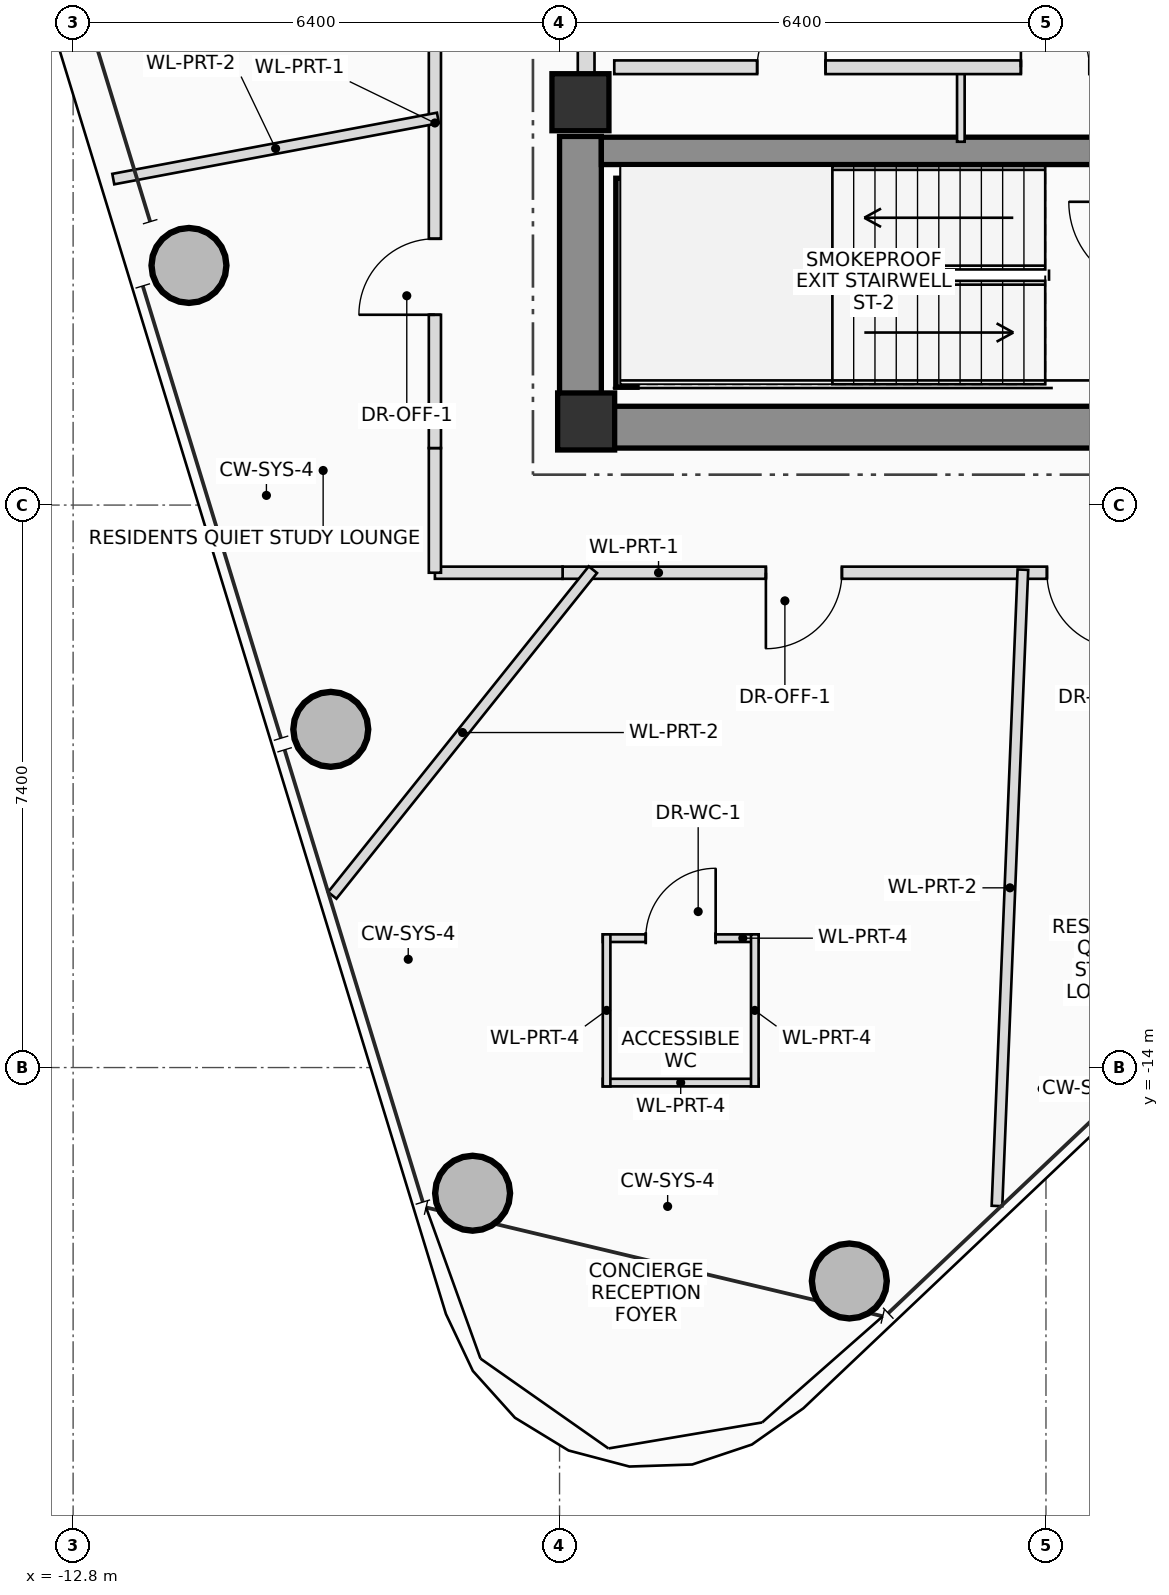
"""IFC4 building model, lengths in metres.
Left out: names, types, materials, properties, quantities, classifications, styles, units other than length and angle.
Written with IfcOpenShell. Run it as: python <this file> out.ifc"""

import sys

from ifc_helpers import new_model, si_unit, direction, frame, frame_2d, origin, origin_2d, place, context, subcontext, project, spatial, rectangle, hollow_circle, extrude, source, transform, mapped, element, fill, save


model = new_model("IFC4")
c1 = context("Model", 3, precision=1e-05, world=origin(), true_north=direction((0.0, 1.0)))
c2 = subcontext(c1, "Body", "Model", "MODEL_VIEW")
j1 = project(units=[si_unit("LENGTHUNIT", "METRE"), si_unit("PLANEANGLEUNIT", "RADIAN")], contexts=[c1])
p1 = place(None, origin())
s1 = spatial("IfcSite", under=j1, at=p1, CompositionType="ELEMENT")
p2 = place(p1, origin())
s2 = spatial("IfcBuilding", under=s1, at=p2, CompositionType="ELEMENT")
p3 = place(p2, frame((0.0, 0.0, 245.65)))
s3 = spatial("IfcBuildingStorey", under=s2, at=p3, CompositionType="ELEMENT", Elevation=245.65)
m1 = source(origin(), c2, "Body", "SweptSolid", [
    extrude(rectangle(XDim=0.75, YDim=0.75, at=origin_2d()), origin(), (0.0, 0.0, 1.0), 3.4),
])
p4 = place(p3, frame((-6.05, -5.5, 0.0), z_axis=(0.0, 0.0, 1.0), x_axis=(1.0, 0.0, 0.0)))
e1 = element("IfcColumn", 1, at=p4, inside=s3, PredefinedType="COLUMN", context=c2, shape_type="MappedRepresentation", body=[
    mapped(m1, transform((0.0, 0.0, 0.0), scale=1.0)),
])
p5 = place(p3, frame((-6.4, -5.575, 0.0), z_axis=(0.0, 0.0, 1.0), x_axis=(1.0, 0.0, 0.0)))
e2 = element("IfcWall", 2, at=p5, inside=s3, PredefinedType="SHEAR", context=c2, shape_type="SweptSolid", body=[
    extrude(rectangle(XDim=12.8, YDim=0.55, at=frame_2d((6.4, 0.0))), origin(), (0.0, 0.0, 1.0), 3.4),
])
p6 = place(p5, frame((8.6, 0.0, 0.0)))
e3 = element("IfcOpeningElement", 3, at=p6, cuts=e2, PredefinedType="OPENING", context=c2, shape_type="SweptSolid", body=[
    extrude(rectangle(XDim=1.2, YDim=2.2, at=frame_2d((0.6, 1.1))), frame((0.0, 0.285, 0.0), z_axis=(0.0, -1.0, 0.0), x_axis=(1.0, 0.0, 0.0)), (0.0, 0.0, 1.0), 0.57),
])
p7 = place(p3, frame((-6.125, -5.3, 0.0), z_axis=(0.0, 0.0, 1.0), x_axis=(0.0, 1.0, 0.0)))
e4 = element("IfcWall", 4, at=p7, inside=s3, PredefinedType="SHEAR", context=c2, shape_type="SweptSolid", body=[
    extrude(rectangle(XDim=3.55, YDim=0.55, at=frame_2d((1.775, 0.0))), origin(), (0.0, 0.0, 1.0), 3.4),
])
p8 = place(p3, frame((-5.85, -1.94, 0.0), z_axis=(0.0, 0.0, 1.0), x_axis=(1.0, 0.0, 0.0)))
e5 = element("IfcWall", 5, at=p8, inside=s3, PredefinedType="SHEAR", context=c2, shape_type="SweptSolid", body=[
    extrude(rectangle(XDim=11.7, YDim=0.36, at=frame_2d((5.85, 0.0))), origin(), (0.0, 0.0, 1.0), 3.4),
])
p9 = place(p3, frame((-5.52, -5.05, 0.0), z_axis=(0.0, 0.0, 1.0), x_axis=(0.0, 1.0, 0.0)))
e6 = element("IfcWall", 6, at=p9, inside=s3, PredefinedType="SHEAR", context=c2, shape_type="SweptSolid", body=[
    extrude(rectangle(XDim=2.75, YDim=0.28, at=frame_2d((1.375, 0.0))), origin(), (0.0, 0.0, 1.0), 3.4),
])
p10 = place(p3, frame((-6.125, -1.3, 0.0), z_axis=(0.0, 0.0, 1.0), x_axis=(1.0, 0.0, 0.0)))
e7 = element("IfcColumn", 7, at=p10, inside=s3, PredefinedType="COLUMN", context=c2, shape_type="MappedRepresentation", body=[
    mapped(m1, transform((0.0, 0.0, 0.0), scale=1.0)),
])
m2 = source(origin(), c2, "Body", "SweptSolid", [
    extrude(hollow_circle(Radius=0.5, WallThickness=0.04, at=origin_2d()), origin(), (0.0, 0.0, 1.0), 3.4),
])
for number, where, z_axis, x_axis in (
    (8, (-2.587, -16.808, 0.0), (0.0, 0.0, 1.0), (1.0, 0.0, 0.0)),
    (9, (-11.276, -3.448, 0.0), (0.0, 0.0, 1.0), (1.0, 0.0, 0.0)),
    (10, (-9.41, -9.55, 0.0), (0.0, 0.0, 1.0), (1.0, 0.0, 0.0)),
    (11, (-7.544, -15.653, 0.0), (0.0, 0.0, 1.0), (1.0, 0.0, 0.0)),
):
    element("IfcColumn", number, at=place(p3, frame(where, z_axis=z_axis, x_axis=x_axis)), inside=s3, PredefinedType="COLUMN", context=c2, shape_type="MappedRepresentation", body=[
        mapped(m2, transform((0.0, 0.0, 0.0), scale=1.0)),
    ])
p11 = place(p3, frame((-6.05, -0.95, 0.0), z_axis=(0.0, 0.0, 1.0), x_axis=(0.0, 1.0, 0.0)))
e12 = element("IfcWall", 12, at=p11, inside=s3, PredefinedType="PLUMBINGWALL", context=c2, shape_type="SweptSolid", body=[
    extrude(rectangle(XDim=1.9, YDim=0.22, at=frame_2d((0.95, 0.0))), origin(), (0.0, 0.0, 1.0), 2.18),
])
p12 = place(p11, frame((0.35, 0.0, 0.0)))
e13 = element("IfcOpeningElement", 13, at=p12, cuts=e12, PredefinedType="OPENING", context=c2, shape_type="SweptSolid", body=[
    extrude(rectangle(XDim=1.2, YDim=2.2, at=frame_2d((0.6, 1.1))), frame((0.0, 0.12, 0.0), z_axis=(0.0, -1.0, 0.0), x_axis=(1.0, 0.0, 0.0)), (0.0, 0.0, 1.0), 0.24),
])
p13 = place(p3, frame((-1.12, -1.82, 0.0), z_axis=(0.0, 0.0, 1.0), x_axis=(0.0, 1.0, 0.0)))
e14 = element("IfcWall", 14, at=p13, inside=s3, PredefinedType="PARTITIONING", context=c2, shape_type="SweptSolid", body=[
    extrude(rectangle(XDim=0.98, YDim=0.1, at=frame_2d((0.49, 0.0))), origin(), (0.0, 0.0, 1.0), 3.2),
])
p14 = place(p3, frame((-5.68, -0.84, 0.0), z_axis=(0.0, 0.0, 1.0), x_axis=(1.0, 0.0, 0.0)))
e15 = element("IfcWall", 15, at=p14, inside=s3, PredefinedType="PLUMBINGWALL", context=c2, shape_type="SweptSolid", body=[
    extrude(rectangle(XDim=11.33, YDim=0.18, at=frame_2d((5.665, 0.0))), origin(), (0.0, 0.0, 1.0), 3.2),
])
p15 = place(p14, frame((1.88, 0.0, 0.0)))
e16 = element("IfcOpeningElement", 16, at=p15, cuts=e15, PredefinedType="OPENING", context=c2, shape_type="SweptSolid", body=[
    extrude(rectangle(XDim=0.9, YDim=2.05, at=frame_2d((0.45, 1.025))), frame((0.0, 0.1, 0.0), z_axis=(0.0, -1.0, 0.0), x_axis=(1.0, 0.0, 0.0)), (0.0, 0.0, 1.0), 0.2),
])
p16 = place(p14, frame((5.35, 0.0, 0.0)))
e17 = element("IfcOpeningElement", 17, at=p16, cuts=e15, PredefinedType="OPENING", context=c2, shape_type="SweptSolid", body=[
    extrude(rectangle(XDim=0.9, YDim=2.05, at=frame_2d((0.45, 1.025))), frame((0.0, 0.1, 0.0), z_axis=(0.0, -1.0, 0.0), x_axis=(1.0, 0.0, 0.0)), (0.0, 0.0, 1.0), 0.2),
])
p17 = place(p14, frame((7.33, 0.0, 0.0)))
e18 = element("IfcOpeningElement", 18, at=p17, cuts=e15, PredefinedType="OPENING", context=c2, shape_type="SweptSolid", body=[
    extrude(rectangle(XDim=1.1, YDim=2.2, at=frame_2d((0.55, 1.1))), frame((0.0, 0.1, 0.0), z_axis=(0.0, -1.0, 0.0), x_axis=(1.0, 0.0, 0.0)), (0.0, 0.0, 1.0), 0.2),
])
p18 = place(p14, frame((8.9, 0.0, 0.0)))
e19 = element("IfcOpeningElement", 19, at=p18, cuts=e15, PredefinedType="OPENING", context=c2, shape_type="SweptSolid", body=[
    extrude(rectangle(XDim=0.9, YDim=2.05, at=frame_2d((0.45, 1.025))), frame((0.0, 0.1, 0.0), z_axis=(0.0, -1.0, 0.0), x_axis=(1.0, 0.0, 0.0)), (0.0, 0.0, 1.0), 0.2),
])
p19 = place(p14, frame((10.25, 0.0, 0.0)))
e20 = element("IfcOpeningElement", 20, at=p19, cuts=e15, PredefinedType="OPENING", context=c2, shape_type="SweptSolid", body=[
    extrude(rectangle(XDim=0.9, YDim=2.05, at=frame_2d((0.45, 1.025))), frame((0.0, 0.1, 0.0), z_axis=(0.0, -1.0, 0.0), x_axis=(1.0, 0.0, 0.0)), (0.0, 0.0, 1.0), 0.2),
])
p20 = place(p3, frame((-5.831, -12.298, 0.0), z_axis=(0.0, 0.0, 1.0), x_axis=(1.0, 0.0, 0.0)))
e21 = element("IfcWall", 21, at=p20, inside=s3, PredefinedType="PARTITIONING", context=c2, shape_type="SweptSolid", body=[
    extrude(rectangle(XDim=2.05, YDim=0.1, at=frame_2d((1.025, 0.0))), origin(), (0.0, 0.0, 1.0), 2.605),
])
p21 = place(p20, frame((0.565, 0.0, 0.0)))
e22 = element("IfcOpeningElement", 22, at=p21, cuts=e21, PredefinedType="OPENING", context=c2, shape_type="SweptSolid", body=[
    extrude(rectangle(XDim=0.92, YDim=2.1, at=frame_2d((0.46, 1.05))), frame((0.0, 0.06, 0.0), z_axis=(0.0, -1.0, 0.0), x_axis=(1.0, 0.0, 0.0)), (0.0, 0.0, 1.0), 0.12),
])
p22 = place(p3, frame((-3.781, -14.198, 0.0), z_axis=(0.0, 0.0, 1.0), x_axis=(-1.0, 0.0, 0.0)))
e23 = element("IfcWall", 23, at=p22, inside=s3, PredefinedType="PARTITIONING", context=c2, shape_type="SweptSolid", body=[
    extrude(rectangle(XDim=2.05, YDim=0.1, at=frame_2d((1.025, 0.0))), origin(), (0.0, 0.0, 1.0), 3.2),
])
p23 = place(p3, frame((-3.831, -12.248, 0.0), z_axis=(0.0, 0.0, 1.0), x_axis=(0.0, -1.0, 0.0)))
e24 = element("IfcWall", 24, at=p23, inside=s3, PredefinedType="PARTITIONING", context=c2, shape_type="SweptSolid", body=[
    extrude(rectangle(XDim=2.0, YDim=0.1, at=frame_2d((1.0, 0.0))), origin(), (0.0, 0.0, 1.0), 2.605),
])
p24 = place(p3, frame((-5.781, -14.248, 0.0), z_axis=(0.0, 0.0, 1.0), x_axis=(0.0, 1.0, 0.0)))
e25 = element("IfcWall", 25, at=p24, inside=s3, PredefinedType="PARTITIONING", context=c2, shape_type="SweptSolid", body=[
    extrude(rectangle(XDim=2.0, YDim=0.1, at=frame_2d((1.0, 0.0))), origin(), (0.0, 0.0, 1.0), 2.855),
])
p25 = place(p3, frame((3.45, -7.49, 0.0), z_axis=(0.0, 0.0, 1.0), x_axis=(-1.0, 0.0, 0.0)))
e26 = element("IfcWall", 26, at=p25, inside=s3, PredefinedType="PARTITIONING", context=c2, shape_type="SweptSolid", body=[
    extrude(rectangle(XDim=9.81, YDim=0.16, at=frame_2d((4.905, 0.0))), origin(), (0.0, 0.0, 1.0), 2.605),
])
p26 = place(p25, frame((2.437, 0.0, 0.0)))
e27 = element("IfcOpeningElement", 27, at=p26, cuts=e26, PredefinedType="OPENING", context=c2, shape_type="SweptSolid", body=[
    extrude(rectangle(XDim=1.0, YDim=2.25, at=frame_2d((0.5, 1.125))), frame((0.0, 0.09, 0.0), z_axis=(0.0, -1.0, 0.0), x_axis=(1.0, 0.0, 0.0)), (0.0, 0.0, 1.0), 0.18),
])
p27 = place(p25, frame((6.135, 0.0, 0.0)))
e28 = element("IfcOpeningElement", 28, at=p27, cuts=e26, PredefinedType="OPENING", context=c2, shape_type="SweptSolid", body=[
    extrude(rectangle(XDim=1.0, YDim=2.25, at=frame_2d((0.5, 1.125))), frame((0.0, 0.09, 0.0), z_axis=(0.0, -1.0, 0.0), x_axis=(1.0, 0.0, 0.0)), (0.0, 0.0, 1.0), 0.18),
])
p28 = place(p3, frame((-6.36, -7.49, 0.0), z_axis=(0.0, 0.0, 1.0), x_axis=(-1.0, 0.0, 0.0)))
e29 = element("IfcWall", 29, at=p28, inside=s3, PredefinedType="PARTITIONING", context=c2, shape_type="SweptSolid", body=[
    extrude(rectangle(XDim=1.68, YDim=0.16, at=frame_2d((0.84, 0.0))), origin(), (0.0, 0.0, 1.0), 2.605),
])
p29 = place(p3, frame((-8.04, -7.49, 0.0), z_axis=(0.0, 0.0, 1.0), x_axis=(0.0, 1.0, 0.0)))
e30 = element("IfcWall", 30, at=p29, inside=s3, PredefinedType="PARTITIONING", context=c2, shape_type="SweptSolid", body=[
    extrude(rectangle(XDim=1.64, YDim=0.16, at=frame_2d((0.82, 0.0))), origin(), (0.0, 0.0, 1.0), 2.805),
])
p30 = place(p3, frame((-8.04, -5.85, 0.0), z_axis=(0.0, 0.0, 1.0), x_axis=(0.0, 1.0, 0.0)))
e31 = element("IfcWall", 31, at=p30, inside=s3, PredefinedType="PARTITIONING", context=c2, shape_type="SweptSolid", body=[
    extrude(rectangle(XDim=11.7, YDim=0.16, at=frame_2d((5.85, 0.0))), origin(), (0.0, 0.0, 1.0), 2.605),
])
p31 = place(p30, frame((1.754, 0.0, 0.0)))
e32 = element("IfcOpeningElement", 32, at=p31, cuts=e31, PredefinedType="OPENING", context=c2, shape_type="SweptSolid", body=[
    extrude(rectangle(XDim=1.0, YDim=2.25, at=frame_2d((0.5, 1.125))), frame((0.0, 0.09, 0.0), z_axis=(0.0, -1.0, 0.0), x_axis=(1.0, 0.0, 0.0)), (0.0, 0.0, 1.0), 0.18),
])
p32 = place(p30, frame((5.8, 0.0, 0.0)))
e33 = element("IfcOpeningElement", 33, at=p32, cuts=e31, PredefinedType="OPENING", context=c2, shape_type="SweptSolid", body=[
    extrude(rectangle(XDim=1.0, YDim=2.25, at=frame_2d((0.5, 1.125))), frame((0.0, 0.09, 0.0), z_axis=(0.0, -1.0, 0.0), x_axis=(1.0, 0.0, 0.0)), (0.0, 0.0, 1.0), 0.18),
])
p33 = place(p30, frame((9.103, 0.0, 0.0)))
e34 = element("IfcOpeningElement", 34, at=p33, cuts=e31, PredefinedType="OPENING", context=c2, shape_type="SweptSolid", body=[
    extrude(rectangle(XDim=1.0, YDim=2.25, at=frame_2d((0.5, 1.125))), frame((0.0, 0.09, 0.0), z_axis=(0.0, -1.0, 0.0), x_axis=(1.0, 0.0, 0.0)), (0.0, 0.0, 1.0), 0.18),
])
p34 = place(p3, frame((-8.0, -1.507, 0.0), z_axis=(0.0, 0.0, 1.0), x_axis=(-0.982724350189, -0.185075259138, 0.0)))
e35 = element("IfcWall", 35, at=p34, inside=s3, PredefinedType="PARTITIONING", context=c2, shape_type="SweptSolid", body=[
    extrude(rectangle(XDim=4.347, YDim=0.14, at=frame_2d((2.173, 0.0))), origin(), (0.0, 0.0, 1.0), 2.765),
])
p35 = place(p3, frame((-5.961, -7.45, 0.0), z_axis=(0.0, 0.0, 1.0), x_axis=(-0.624787267525, -0.780795024535, 0.0)))
e36 = element("IfcWall", 36, at=p35, inside=s3, PredefinedType="PARTITIONING", context=c2, shape_type="SweptSolid", body=[
    extrude(rectangle(XDim=5.488, YDim=0.14, at=frame_2d((2.744, 0.0))), origin(), (0.0, 0.0, 1.0), 2.605),
])
p36 = place(p3, frame((-0.304, -7.45, 0.0), z_axis=(0.0, 0.0, 1.0), x_axis=(-0.04070934235, -0.999171031128, 0.0)))
e37 = element("IfcWall", 37, at=p36, inside=s3, PredefinedType="PARTITIONING", context=c2, shape_type="SweptSolid", body=[
    extrude(rectangle(XDim=8.378, YDim=0.14, at=frame_2d((4.189, 0.0))), origin(), (0.0, 0.0, 1.0), 2.765),
])
p37 = place(p15, origin())
e38 = element("IfcDoor", 38, at=p37, inside=s3, OperationType="SINGLE_SWING_RIGHT", PredefinedType="DOOR", context=c2, shape_type="SweptSolid", body=[
    extrude(rectangle(XDim=0.9, YDim=2.05, at=frame_2d((0.45, 1.025))), frame((0.0, 0.025, 0.0), z_axis=(0.0, -1.0, 0.0), x_axis=(1.0, 0.0, 0.0)), (0.0, 0.0, 1.0), 0.05),
])
fill(e16, e38)
p38 = place(p16, origin())
e39 = element("IfcDoor", 39, at=p38, inside=s3, OperationType="SINGLE_SWING_LEFT", PredefinedType="DOOR", context=c2, shape_type="SweptSolid", body=[
    extrude(rectangle(XDim=0.9, YDim=2.05, at=frame_2d((0.45, 1.025))), frame((0.0, 0.025, 0.0), z_axis=(0.0, -1.0, 0.0), x_axis=(1.0, 0.0, 0.0)), (0.0, 0.0, 1.0), 0.05),
])
fill(e17, e39)
p39 = place(p21, origin())
e40 = element("IfcDoor", 40, at=p39, inside=s3, OperationType="SINGLE_SWING_RIGHT", PredefinedType="DOOR", context=c2, shape_type="SweptSolid", body=[
    extrude(rectangle(XDim=0.92, YDim=2.1, at=frame_2d((0.46, 1.05))), frame((0.0, 0.025, 0.0), z_axis=(0.0, -1.0, 0.0), x_axis=(1.0, 0.0, 0.0)), (0.0, 0.0, 1.0), 0.05),
])
fill(e22, e40)
p40 = place(p26, origin())
e41 = element("IfcDoor", 41, at=p40, inside=s3, OperationType="SINGLE_SWING_LEFT", PredefinedType="DOOR", context=c2, shape_type="SweptSolid", body=[
    extrude(rectangle(XDim=1.0, YDim=2.25, at=frame_2d((0.5, 1.125))), frame((0.0, 0.025, 0.0), z_axis=(0.0, -1.0, 0.0), x_axis=(1.0, 0.0, 0.0)), (0.0, 0.0, 1.0), 0.05),
])
fill(e27, e41)
p41 = place(p27, origin())
e42 = element("IfcDoor", 42, at=p41, inside=s3, OperationType="SINGLE_SWING_RIGHT", PredefinedType="DOOR", context=c2, shape_type="SweptSolid", body=[
    extrude(rectangle(XDim=1.0, YDim=2.25, at=frame_2d((0.5, 1.125))), frame((0.0, 0.025, 0.0), z_axis=(0.0, -1.0, 0.0), x_axis=(1.0, 0.0, 0.0)), (0.0, 0.0, 1.0), 0.05),
])
fill(e28, e42)
p42 = place(p31, origin())
e43 = element("IfcDoor", 43, at=p42, inside=s3, OperationType="SINGLE_SWING_LEFT", PredefinedType="DOOR", context=c2, shape_type="SweptSolid", body=[
    extrude(rectangle(XDim=1.0, YDim=2.25, at=frame_2d((0.5, 1.125))), frame((0.0, 0.025, 0.0), z_axis=(0.0, -1.0, 0.0), x_axis=(1.0, 0.0, 0.0)), (0.0, 0.0, 1.0), 0.05),
])
fill(e32, e43)
save(model, sys.argv[1])
